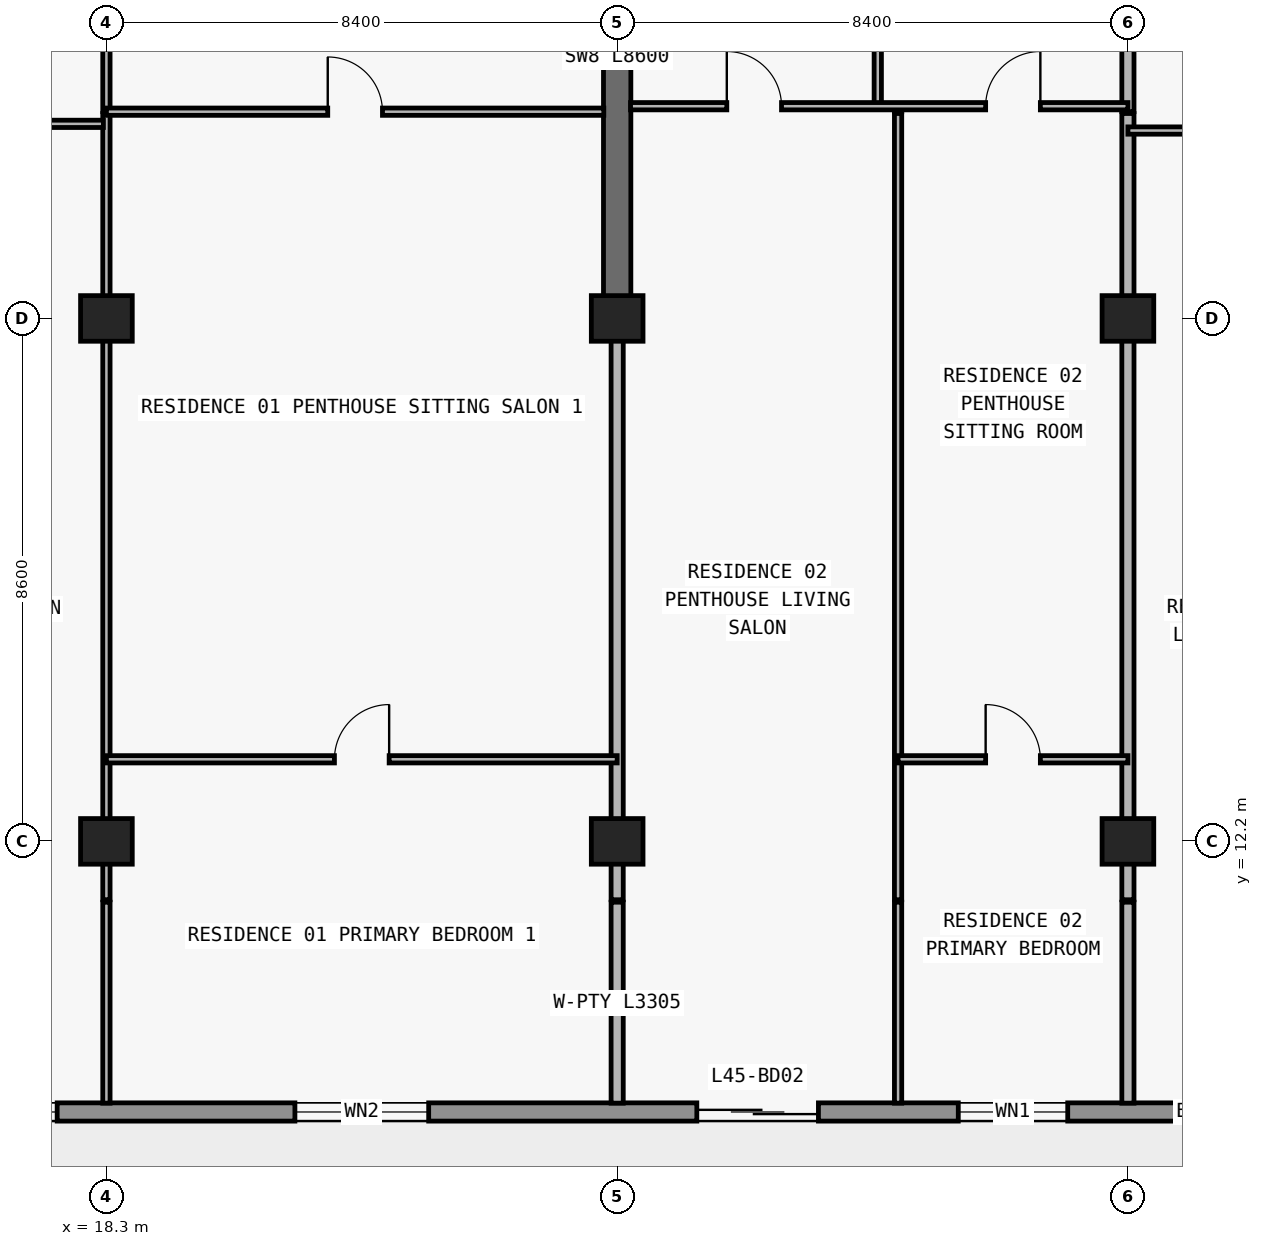
"""IFC4 building model, lengths in metres.
Left out: names, types, materials, properties, quantities, classifications, styles, units other than length and angle.
Written with IfcOpenShell. Run it as: python <this file> out.ifc"""

import sys

from ifc_helpers import new_model, si_unit, direction, frame, frame_2d, origin, origin_2d, place, context, subcontext, project, spatial, rectangle, extrude, element, fill, save


model = new_model("IFC4")
c1 = context("Model", 3, precision=1e-05, world=origin(), true_north=direction((0.0, 1.0)))
c2 = subcontext(c1, "Body", "Model", "MODEL_VIEW")
j1 = project(units=[si_unit("LENGTHUNIT", "METRE"), si_unit("PLANEANGLEUNIT", "RADIAN")], contexts=[c1])
p1 = place(None, origin())
s1 = spatial("IfcSite", under=j1, at=p1, CompositionType="ELEMENT")
p2 = place(p1, origin())
s2 = spatial("IfcBuilding", under=s1, at=p2, CompositionType="ELEMENT")
p3 = place(p2, frame((0.0, 0.0, 163.8)))
s3 = spatial("IfcBuildingStorey", under=s2, at=p3, CompositionType="ELEMENT", Elevation=163.8)
for number, where, z_axis, x_axis in (
    (1, (18.3, 12.2, 0.0), (0.0, 0.0, 1.0), (1.0, 0.0, 0.0)),
    (2, (26.7, 12.2, 0.0), (0.0, 0.0, 1.0), (1.0, 0.0, 0.0)),
    (3, (35.1, 12.2, 0.0), (0.0, 0.0, 1.0), (1.0, 0.0, 0.0)),
    (4, (18.3, 20.8, 0.0), (0.0, 0.0, 1.0), (1.0, 0.0, 0.0)),
    (5, (26.7, 20.8, 0.0), (0.0, 0.0, 1.0), (1.0, 0.0, 0.0)),
    (6, (35.1, 20.8, 0.0), (0.0, 0.0, 1.0), (1.0, 0.0, 0.0)),
):
    element("IfcColumn", number, at=place(p3, frame(where, z_axis=z_axis, x_axis=x_axis)), inside=s3, PredefinedType="COLUMN", context=c2, shape_type="SweptSolid", body=[
        extrude(rectangle(XDim=0.85, YDim=0.75, at=origin_2d()), origin(), (0.0, 0.0, 1.0), 3.05),
    ])
p4 = place(p3, frame((26.7, 20.8, 0.0), z_axis=(0.0, 0.0, 1.0), x_axis=(0.0, 1.0, 0.0)))
e7 = element("IfcWall", 7, at=p4, inside=s3, PredefinedType="SHEAR", context=c2, shape_type="SweptSolid", body=[
    extrude(rectangle(XDim=8.6, YDim=0.45, at=frame_2d((4.3, 0.0))), origin(), (0.0, 0.0, 1.0), 3.05),
])
p5 = place(p3, frame((67.7, 7.75, 0.0), z_axis=(0.0, 0.0, 1.0), x_axis=(-1.0, 0.0, 0.0)))
e8 = element("IfcWall", 8, at=p5, inside=s3, PredefinedType="STANDARD", context=c2, shape_type="SweptSolid", body=[
    extrude(rectangle(XDim=57.6, YDim=0.3, at=frame_2d((28.8, 0.0))), origin(), (0.0, 0.0, 1.0), 3.05),
])
p6 = place(p5, frame((54.69, 0.0, 0.0)))
e9 = element("IfcOpeningElement", 9, at=p6, cuts=e8, PredefinedType="OPENING", context=c2, shape_type="SweptSolid", body=[
    extrude(rectangle(XDim=2.0, YDim=2.3, at=frame_2d((1.0, 1.15))), frame((0.0, 0.16, 0.0), z_axis=(0.0, -1.0, 0.0), x_axis=(1.0, 0.0, 0.0)), (0.0, 0.0, 1.0), 0.32),
])
p7 = place(p5, frame((50.21, 0.0, 0.65)))
e10 = element("IfcOpeningElement", 10, at=p7, cuts=e8, PredefinedType="OPENING", context=c2, shape_type="SweptSolid", body=[
    extrude(rectangle(XDim=2.6, YDim=1.85, at=frame_2d((1.3, 0.925))), frame((0.0, 0.16, 0.0), z_axis=(0.0, -1.0, 0.0), x_axis=(1.0, 0.0, 0.0)), (0.0, 0.0, 1.0), 0.32),
])
p8 = place(p5, frame((44.1, 0.0, 0.85)))
e11 = element("IfcOpeningElement", 11, at=p8, cuts=e8, PredefinedType="OPENING", context=c2, shape_type="SweptSolid", body=[
    extrude(rectangle(XDim=2.2, YDim=1.55, at=frame_2d((1.1, 0.775))), frame((0.0, 0.16, 0.0), z_axis=(0.0, -1.0, 0.0), x_axis=(1.0, 0.0, 0.0)), (0.0, 0.0, 1.0), 0.32),
])
p9 = place(p5, frame((37.69, 0.0, 0.0)))
e12 = element("IfcOpeningElement", 12, at=p9, cuts=e8, PredefinedType="OPENING", context=c2, shape_type="SweptSolid", body=[
    extrude(rectangle(XDim=2.0, YDim=2.3, at=frame_2d((1.0, 1.15))), frame((0.0, 0.16, 0.0), z_axis=(0.0, -1.0, 0.0), x_axis=(1.0, 0.0, 0.0)), (0.0, 0.0, 1.0), 0.32),
])
p10 = place(p5, frame((33.59, 0.0, 0.85)))
e13 = element("IfcOpeningElement", 13, at=p10, cuts=e8, PredefinedType="OPENING", context=c2, shape_type="SweptSolid", body=[
    extrude(rectangle(XDim=1.8, YDim=1.55, at=frame_2d((0.9, 0.775))), frame((0.0, 0.16, 0.0), z_axis=(0.0, -1.0, 0.0), x_axis=(1.0, 0.0, 0.0)), (0.0, 0.0, 1.0), 0.32),
])
p11 = place(p5, frame((25.914, 0.0, 0.85)))
e14 = element("IfcOpeningElement", 14, at=p11, cuts=e8, PredefinedType="OPENING", context=c2, shape_type="SweptSolid", body=[
    extrude(rectangle(XDim=2.2, YDim=1.55, at=frame_2d((1.1, 0.775))), frame((0.0, 0.16, 0.0), z_axis=(0.0, -1.0, 0.0), x_axis=(1.0, 0.0, 0.0)), (0.0, 0.0, 1.0), 0.32),
])
p12 = place(p5, frame((21.69, 0.0, 0.0)))
e15 = element("IfcOpeningElement", 15, at=p12, cuts=e8, PredefinedType="OPENING", context=c2, shape_type="SweptSolid", body=[
    extrude(rectangle(XDim=2.0, YDim=2.3, at=frame_2d((1.0, 1.15))), frame((0.0, 0.16, 0.0), z_axis=(0.0, -1.0, 0.0), x_axis=(1.0, 0.0, 0.0)), (0.0, 0.0, 1.0), 0.32),
])
p13 = place(p5, frame((17.59, 0.0, 0.85)))
e16 = element("IfcOpeningElement", 16, at=p13, cuts=e8, PredefinedType="OPENING", context=c2, shape_type="SweptSolid", body=[
    extrude(rectangle(XDim=1.8, YDim=1.55, at=frame_2d((0.9, 0.775))), frame((0.0, 0.16, 0.0), z_axis=(0.0, -1.0, 0.0), x_axis=(1.0, 0.0, 0.0)), (0.0, 0.0, 1.0), 0.32),
])
p14 = place(p5, frame((13.69, 0.0, 0.0)))
e17 = element("IfcOpeningElement", 17, at=p14, cuts=e8, PredefinedType="OPENING", context=c2, shape_type="SweptSolid", body=[
    extrude(rectangle(XDim=2.0, YDim=2.3, at=frame_2d((1.0, 1.15))), frame((0.0, 0.16, 0.0), z_axis=(0.0, -1.0, 0.0), x_axis=(1.0, 0.0, 0.0)), (0.0, 0.0, 1.0), 0.32),
])
p15 = place(p5, frame((9.01, 0.0, 0.65)))
e18 = element("IfcOpeningElement", 18, at=p15, cuts=e8, PredefinedType="OPENING", context=c2, shape_type="SweptSolid", body=[
    extrude(rectangle(XDim=2.6, YDim=1.85, at=frame_2d((1.3, 0.925))), frame((0.0, 0.16, 0.0), z_axis=(0.0, -1.0, 0.0), x_axis=(1.0, 0.0, 0.0)), (0.0, 0.0, 1.0), 0.32),
])
p16 = place(p5, frame((3.0, 0.0, 0.85)))
e19 = element("IfcOpeningElement", 19, at=p16, cuts=e8, PredefinedType="OPENING", context=c2, shape_type="SweptSolid", body=[
    extrude(rectangle(XDim=2.2, YDim=1.55, at=frame_2d((1.1, 0.775))), frame((0.0, 0.16, 0.0), z_axis=(0.0, -1.0, 0.0), x_axis=(1.0, 0.0, 0.0)), (0.0, 0.0, 1.0), 0.32),
])
p17 = place(p3, frame((18.3, 7.895, 0.0), z_axis=(0.0, 0.0, 1.0), x_axis=(0.0, 1.0, 0.0)))
e20 = element("IfcWall", 20, at=p17, inside=s3, PredefinedType="PARTITIONING", context=c2, shape_type="SweptSolid", body=[
    extrude(rectangle(XDim=3.305, YDim=0.12, at=frame_2d((1.652, 0.0))), origin(), (0.0, 0.0, 1.0), 3.05),
])
p18 = place(p3, frame((18.3, 11.24, 0.0), z_axis=(0.0, 0.0, 1.0), x_axis=(0.0, 1.0, 0.0)))
e21 = element("IfcWall", 21, at=p18, inside=s3, PredefinedType="PARTITIONING", context=c2, shape_type="SweptSolid", body=[
    extrude(rectangle(XDim=12.93, YDim=0.12, at=frame_2d((6.465, 0.0))), origin(), (0.0, 0.0, 1.0), 2.263),
])
p19 = place(p3, frame((18.3, 24.2, 0.0), z_axis=(0.0, 0.0, 1.0), x_axis=(0.0, 1.0, 0.0)))
e22 = element("IfcWall", 22, at=p19, inside=s3, PredefinedType="PARTITIONING", context=c2, shape_type="SweptSolid", body=[
    extrude(rectangle(XDim=4.84, YDim=0.12, at=frame_2d((2.42, 0.0))), origin(), (0.0, 0.0, 1.0), 2.263),
])
p20 = place(p19, frame((1.75, 0.0, 0.0)))
e23 = element("IfcOpeningElement", 23, at=p20, cuts=e22, PredefinedType="OPENING", context=c2, shape_type="SweptSolid", body=[
    extrude(rectangle(XDim=0.9, YDim=2.15, at=frame_2d((0.45, 1.075))), frame((0.0, 0.07, 0.0), z_axis=(0.0, -1.0, 0.0), x_axis=(1.0, 0.0, 0.0)), (0.0, 0.0, 1.0), 0.14),
])
p21 = place(p3, frame((26.7, 7.895, 0.0), z_axis=(0.0, 0.0, 1.0), x_axis=(0.0, 1.0, 0.0)))
e24 = element("IfcWall", 24, at=p21, inside=s3, PredefinedType="PARTITIONING", context=c2, shape_type="SweptSolid", body=[
    extrude(rectangle(XDim=3.305, YDim=0.2, at=frame_2d((1.652, 0.0))), origin(), (0.0, 0.0, 1.0), 3.05),
])
p22 = place(p3, frame((26.7, 11.24, 0.0), z_axis=(0.0, 0.0, 1.0), x_axis=(0.0, 1.0, 0.0)))
e25 = element("IfcWall", 25, at=p22, inside=s3, PredefinedType="PARTITIONING", context=c2, shape_type="SweptSolid", body=[
    extrude(rectangle(XDim=9.555, YDim=0.2, at=frame_2d((4.777, 0.0))), origin(), (0.0, 0.0, 1.0), 2.263),
])
p23 = place(p3, frame((30.986, 24.29, 0.0), z_axis=(0.0, 0.0, 1.0), x_axis=(0.0, 1.0, 0.0)))
e26 = element("IfcWall", 26, at=p23, inside=s3, PredefinedType="PARTITIONING", context=c2, shape_type="SweptSolid", body=[
    extrude(rectangle(XDim=4.75, YDim=0.12, at=frame_2d((2.375, 0.0))), origin(), (0.0, 0.0, 1.0), 2.499),
])
p24 = place(p23, frame((1.925, 0.0, 0.0)))
e27 = element("IfcOpeningElement", 27, at=p24, cuts=e26, PredefinedType="OPENING", context=c2, shape_type="SweptSolid", body=[
    extrude(rectangle(XDim=0.9, YDim=2.15, at=frame_2d((0.45, 1.075))), frame((0.0, 0.07, 0.0), z_axis=(0.0, -1.0, 0.0), x_axis=(1.0, 0.0, 0.0)), (0.0, 0.0, 1.0), 0.14),
])
p25 = place(p3, frame((31.32, 7.895, 0.0), z_axis=(0.0, 0.0, 1.0), x_axis=(0.0, 1.0, 0.0)))
e28 = element("IfcWall", 28, at=p25, inside=s3, PredefinedType="PARTITIONING", context=c2, shape_type="SweptSolid", body=[
    extrude(rectangle(XDim=3.305, YDim=0.12, at=frame_2d((1.652, 0.0))), origin(), (0.0, 0.0, 1.0), 3.05),
])
p26 = place(p3, frame((31.32, 11.24, 0.0), z_axis=(0.0, 0.0, 1.0), x_axis=(0.0, 1.0, 0.0)))
e29 = element("IfcWall", 29, at=p26, inside=s3, PredefinedType="PARTITIONING", context=c2, shape_type="SweptSolid", body=[
    extrude(rectangle(XDim=12.93, YDim=0.12, at=frame_2d((6.465, 0.0))), origin(), (0.0, 0.0, 1.0), 3.05),
])
p27 = place(p3, frame((31.32, 24.2, 0.0), z_axis=(0.0, 0.0, 1.0), x_axis=(0.0, 1.0, 0.0)))
e30 = element("IfcWall", 30, at=p27, inside=s3, PredefinedType="PARTITIONING", context=c2, shape_type="SweptSolid", body=[
    extrude(rectangle(XDim=0.09, YDim=0.12, at=frame_2d((0.045, 0.0))), origin(), (0.0, 0.0, 1.0), 3.05),
])
p28 = place(p3, frame((35.1, 7.895, 0.0), z_axis=(0.0, 0.0, 1.0), x_axis=(0.0, 1.0, 0.0)))
e31 = element("IfcWall", 31, at=p28, inside=s3, PredefinedType="PARTITIONING", context=c2, shape_type="SweptSolid", body=[
    extrude(rectangle(XDim=3.305, YDim=0.2, at=frame_2d((1.652, 0.0))), origin(), (0.0, 0.0, 1.0), 3.05),
])
p29 = place(p3, frame((35.1, 11.24, 0.0), z_axis=(0.0, 0.0, 1.0), x_axis=(0.0, 1.0, 0.0)))
e32 = element("IfcWall", 32, at=p29, inside=s3, PredefinedType="PARTITIONING", context=c2, shape_type="SweptSolid", body=[
    extrude(rectangle(XDim=12.93, YDim=0.2, at=frame_2d((6.465, 0.0))), origin(), (0.0, 0.0, 1.0), 2.263),
])
p30 = place(p3, frame((35.1, 24.2, 0.0), z_axis=(0.0, 0.0, 1.0), x_axis=(0.0, 1.0, 0.0)))
e33 = element("IfcWall", 33, at=p30, inside=s3, PredefinedType="PARTITIONING", context=c2, shape_type="SweptSolid", body=[
    extrude(rectangle(XDim=4.84, YDim=0.2, at=frame_2d((2.42, 0.0))), origin(), (0.0, 0.0, 1.0), 2.263),
])
p31 = place(p3, frame((18.3, 13.55, 0.0), z_axis=(0.0, 0.0, 1.0), x_axis=(1.0, 0.0, 0.0)))
e34 = element("IfcWall", 34, at=p31, inside=s3, PredefinedType="PARTITIONING", context=c2, shape_type="SweptSolid", body=[
    extrude(rectangle(XDim=8.4, YDim=0.12, at=frame_2d((4.2, 0.0))), origin(), (0.0, 0.0, 1.0), 3.05),
])
p32 = place(p31, frame((3.75, 0.0, 0.0)))
e35 = element("IfcOpeningElement", 35, at=p32, cuts=e34, PredefinedType="OPENING", context=c2, shape_type="SweptSolid", body=[
    extrude(rectangle(XDim=0.9, YDim=2.15, at=frame_2d((0.45, 1.075))), frame((0.0, 0.07, 0.0), z_axis=(0.0, -1.0, 0.0), x_axis=(1.0, 0.0, 0.0)), (0.0, 0.0, 1.0), 0.14),
])
p33 = place(p3, frame((31.32, 13.55, 0.0), z_axis=(0.0, 0.0, 1.0), x_axis=(1.0, 0.0, 0.0)))
e36 = element("IfcWall", 36, at=p33, inside=s3, PredefinedType="PARTITIONING", context=c2, shape_type="SweptSolid", body=[
    extrude(rectangle(XDim=3.78, YDim=0.12, at=frame_2d((1.89, 0.0))), origin(), (0.0, 0.0, 1.0), 3.05),
])
p34 = place(p33, frame((1.44, 0.0, 0.0)))
e37 = element("IfcOpeningElement", 37, at=p34, cuts=e36, PredefinedType="OPENING", context=c2, shape_type="SweptSolid", body=[
    extrude(rectangle(XDim=0.9, YDim=2.15, at=frame_2d((0.45, 1.075))), frame((0.0, 0.07, 0.0), z_axis=(0.0, -1.0, 0.0), x_axis=(1.0, 0.0, 0.0)), (0.0, 0.0, 1.0), 0.14),
])
p35 = place(p3, frame((35.1, 23.89, 0.0), z_axis=(0.0, 0.0, 1.0), x_axis=(1.0, 0.0, 0.0)))
e38 = element("IfcWall", 38, at=p35, inside=s3, PredefinedType="PARTITIONING", context=c2, shape_type="SweptSolid", body=[
    extrude(rectangle(XDim=3.572, YDim=0.12, at=frame_2d((1.786, 0.0))), origin(), (0.0, 0.0, 1.0), 3.05),
])
p36 = place(p35, frame((1.336, 0.0, 0.0)))
e39 = element("IfcOpeningElement", 39, at=p36, cuts=e38, PredefinedType="OPENING", context=c2, shape_type="SweptSolid", body=[
    extrude(rectangle(XDim=0.9, YDim=2.15, at=frame_2d((0.45, 1.075))), frame((0.0, 0.07, 0.0), z_axis=(0.0, -1.0, 0.0), x_axis=(1.0, 0.0, 0.0)), (0.0, 0.0, 1.0), 0.14),
])
p37 = place(p3, frame((10.1, 24.0, 0.0), z_axis=(0.0, 0.0, 1.0), x_axis=(1.0, 0.0, 0.0)))
e40 = element("IfcWall", 40, at=p37, inside=s3, PredefinedType="PARTITIONING", context=c2, shape_type="SweptSolid", body=[
    extrude(rectangle(XDim=8.15, YDim=0.12, at=frame_2d((4.075, 0.0))), origin(), (0.0, 0.0, 1.0), 3.05),
])
p38 = place(p37, frame((3.625, 0.0, 0.0)))
e41 = element("IfcOpeningElement", 41, at=p38, cuts=e40, PredefinedType="OPENING", context=c2, shape_type="SweptSolid", body=[
    extrude(rectangle(XDim=0.9, YDim=2.15, at=frame_2d((0.45, 1.075))), frame((0.0, 0.07, 0.0), z_axis=(0.0, -1.0, 0.0), x_axis=(1.0, 0.0, 0.0)), (0.0, 0.0, 1.0), 0.14),
])
p39 = place(p3, frame((18.3, 24.2, 0.0), z_axis=(0.0, 0.0, 1.0), x_axis=(1.0, 0.0, 0.0)))
e42 = element("IfcWall", 42, at=p39, inside=s3, PredefinedType="PARTITIONING", context=c2, shape_type="SweptSolid", body=[
    extrude(rectangle(XDim=8.18, YDim=0.12, at=frame_2d((4.09, 0.0))), origin(), (0.0, 0.0, 1.0), 3.05),
])
p40 = place(p39, frame((3.64, 0.0, 0.0)))
e43 = element("IfcOpeningElement", 43, at=p40, cuts=e42, PredefinedType="OPENING", context=c2, shape_type="SweptSolid", body=[
    extrude(rectangle(XDim=0.9, YDim=2.15, at=frame_2d((0.45, 1.075))), frame((0.0, 0.07, 0.0), z_axis=(0.0, -1.0, 0.0), x_axis=(1.0, 0.0, 0.0)), (0.0, 0.0, 1.0), 0.14),
])
p41 = place(p3, frame((26.92, 24.29, 0.0), z_axis=(0.0, 0.0, 1.0), x_axis=(1.0, 0.0, 0.0)))
e44 = element("IfcWall", 44, at=p41, inside=s3, PredefinedType="PARTITIONING", context=c2, shape_type="SweptSolid", body=[
    extrude(rectangle(XDim=8.18, YDim=0.12, at=frame_2d((4.09, 0.0))), origin(), (0.0, 0.0, 1.0), 3.05),
])
p42 = place(p41, frame((1.583, 0.0, 0.0)))
e45 = element("IfcOpeningElement", 45, at=p42, cuts=e44, PredefinedType="OPENING", context=c2, shape_type="SweptSolid", body=[
    extrude(rectangle(XDim=0.9, YDim=2.15, at=frame_2d((0.45, 1.075))), frame((0.0, 0.07, 0.0), z_axis=(0.0, -1.0, 0.0), x_axis=(1.0, 0.0, 0.0)), (0.0, 0.0, 1.0), 0.14),
])
p43 = place(p41, frame((5.84, 0.0, 0.0)))
e46 = element("IfcOpeningElement", 46, at=p43, cuts=e44, PredefinedType="OPENING", context=c2, shape_type="SweptSolid", body=[
    extrude(rectangle(XDim=0.9, YDim=2.15, at=frame_2d((0.45, 1.075))), frame((0.0, 0.07, 0.0), z_axis=(0.0, -1.0, 0.0), x_axis=(1.0, 0.0, 0.0)), (0.0, 0.0, 1.0), 0.14),
])
p44 = place(p7, origin())
e47 = element("IfcWindow", 47, at=p44, inside=s3, PartitioningType="SINGLE_PANEL", PredefinedType="WINDOW", context=c2, shape_type="SweptSolid", body=[
    extrude(rectangle(XDim=2.6, YDim=1.85, at=frame_2d((1.3, 0.925))), frame((0.0, 0.03, 0.0), z_axis=(0.0, -1.0, 0.0), x_axis=(1.0, 0.0, 0.0)), (0.0, 0.0, 1.0), 0.06),
])
fill(e10, e47)
p45 = place(p8, origin())
e48 = element("IfcWindow", 48, at=p45, inside=s3, PartitioningType="SINGLE_PANEL", PredefinedType="WINDOW", context=c2, shape_type="SweptSolid", body=[
    extrude(rectangle(XDim=2.2, YDim=1.55, at=frame_2d((1.1, 0.775))), frame((0.0, 0.03, 0.0), z_axis=(0.0, -1.0, 0.0), x_axis=(1.0, 0.0, 0.0)), (0.0, 0.0, 1.0), 0.06),
])
fill(e11, e48)
p46 = place(p9, origin())
e49 = element("IfcDoor", 49, at=p46, inside=s3, OperationType="DOUBLE_DOOR_SLIDING", PredefinedType="DOOR", context=c2, shape_type="SweptSolid", body=[
    extrude(rectangle(XDim=2.0, YDim=2.3, at=frame_2d((1.0, 1.15))), frame((0.0, 0.025, 0.0), z_axis=(0.0, -1.0, 0.0), x_axis=(1.0, 0.0, 0.0)), (0.0, 0.0, 1.0), 0.05),
])
fill(e12, e49)
p47 = place(p10, origin())
e50 = element("IfcWindow", 50, at=p47, inside=s3, PartitioningType="SINGLE_PANEL", PredefinedType="WINDOW", context=c2, shape_type="SweptSolid", body=[
    extrude(rectangle(XDim=1.8, YDim=1.55, at=frame_2d((0.9, 0.775))), frame((0.0, 0.03, 0.0), z_axis=(0.0, -1.0, 0.0), x_axis=(1.0, 0.0, 0.0)), (0.0, 0.0, 1.0), 0.06),
])
fill(e13, e50)
p48 = place(p40, origin())
e51 = element("IfcDoor", 51, at=p48, inside=s3, OperationType="SINGLE_SWING_LEFT", PredefinedType="DOOR", context=c2, shape_type="SweptSolid", body=[
    extrude(rectangle(XDim=0.9, YDim=2.15, at=frame_2d((0.45, 1.075))), frame((0.0, 0.025, 0.0), z_axis=(0.0, -1.0, 0.0), x_axis=(1.0, 0.0, 0.0)), (0.0, 0.0, 1.0), 0.05),
])
fill(e43, e51)
p49 = place(p32, origin())
e52 = element("IfcDoor", 52, at=p49, inside=s3, OperationType="SINGLE_SWING_RIGHT", PredefinedType="DOOR", context=c2, shape_type="SweptSolid", body=[
    extrude(rectangle(XDim=0.9, YDim=2.15, at=frame_2d((0.45, 1.075))), frame((0.0, 0.025, 0.0), z_axis=(0.0, -1.0, 0.0), x_axis=(1.0, 0.0, 0.0)), (0.0, 0.0, 1.0), 0.05),
])
fill(e35, e52)
p50 = place(p42, origin())
e53 = element("IfcDoor", 53, at=p50, inside=s3, OperationType="SINGLE_SWING_LEFT", PredefinedType="DOOR", context=c2, shape_type="SweptSolid", body=[
    extrude(rectangle(XDim=0.9, YDim=2.15, at=frame_2d((0.45, 1.075))), frame((0.0, 0.025, 0.0), z_axis=(0.0, -1.0, 0.0), x_axis=(1.0, 0.0, 0.0)), (0.0, 0.0, 1.0), 0.05),
])
fill(e45, e53)
p51 = place(p43, origin())
e54 = element("IfcDoor", 54, at=p51, inside=s3, OperationType="SINGLE_SWING_RIGHT", PredefinedType="DOOR", context=c2, shape_type="SweptSolid", body=[
    extrude(rectangle(XDim=0.9, YDim=2.15, at=frame_2d((0.45, 1.075))), frame((0.0, 0.025, 0.0), z_axis=(0.0, -1.0, 0.0), x_axis=(1.0, 0.0, 0.0)), (0.0, 0.0, 1.0), 0.05),
])
fill(e46, e54)
p52 = place(p34, origin())
e55 = element("IfcDoor", 55, at=p52, inside=s3, OperationType="SINGLE_SWING_LEFT", PredefinedType="DOOR", context=c2, shape_type="SweptSolid", body=[
    extrude(rectangle(XDim=0.9, YDim=2.15, at=frame_2d((0.45, 1.075))), frame((0.0, 0.025, 0.0), z_axis=(0.0, -1.0, 0.0), x_axis=(1.0, 0.0, 0.0)), (0.0, 0.0, 1.0), 0.05),
])
fill(e37, e55)
save(model, sys.argv[1])
